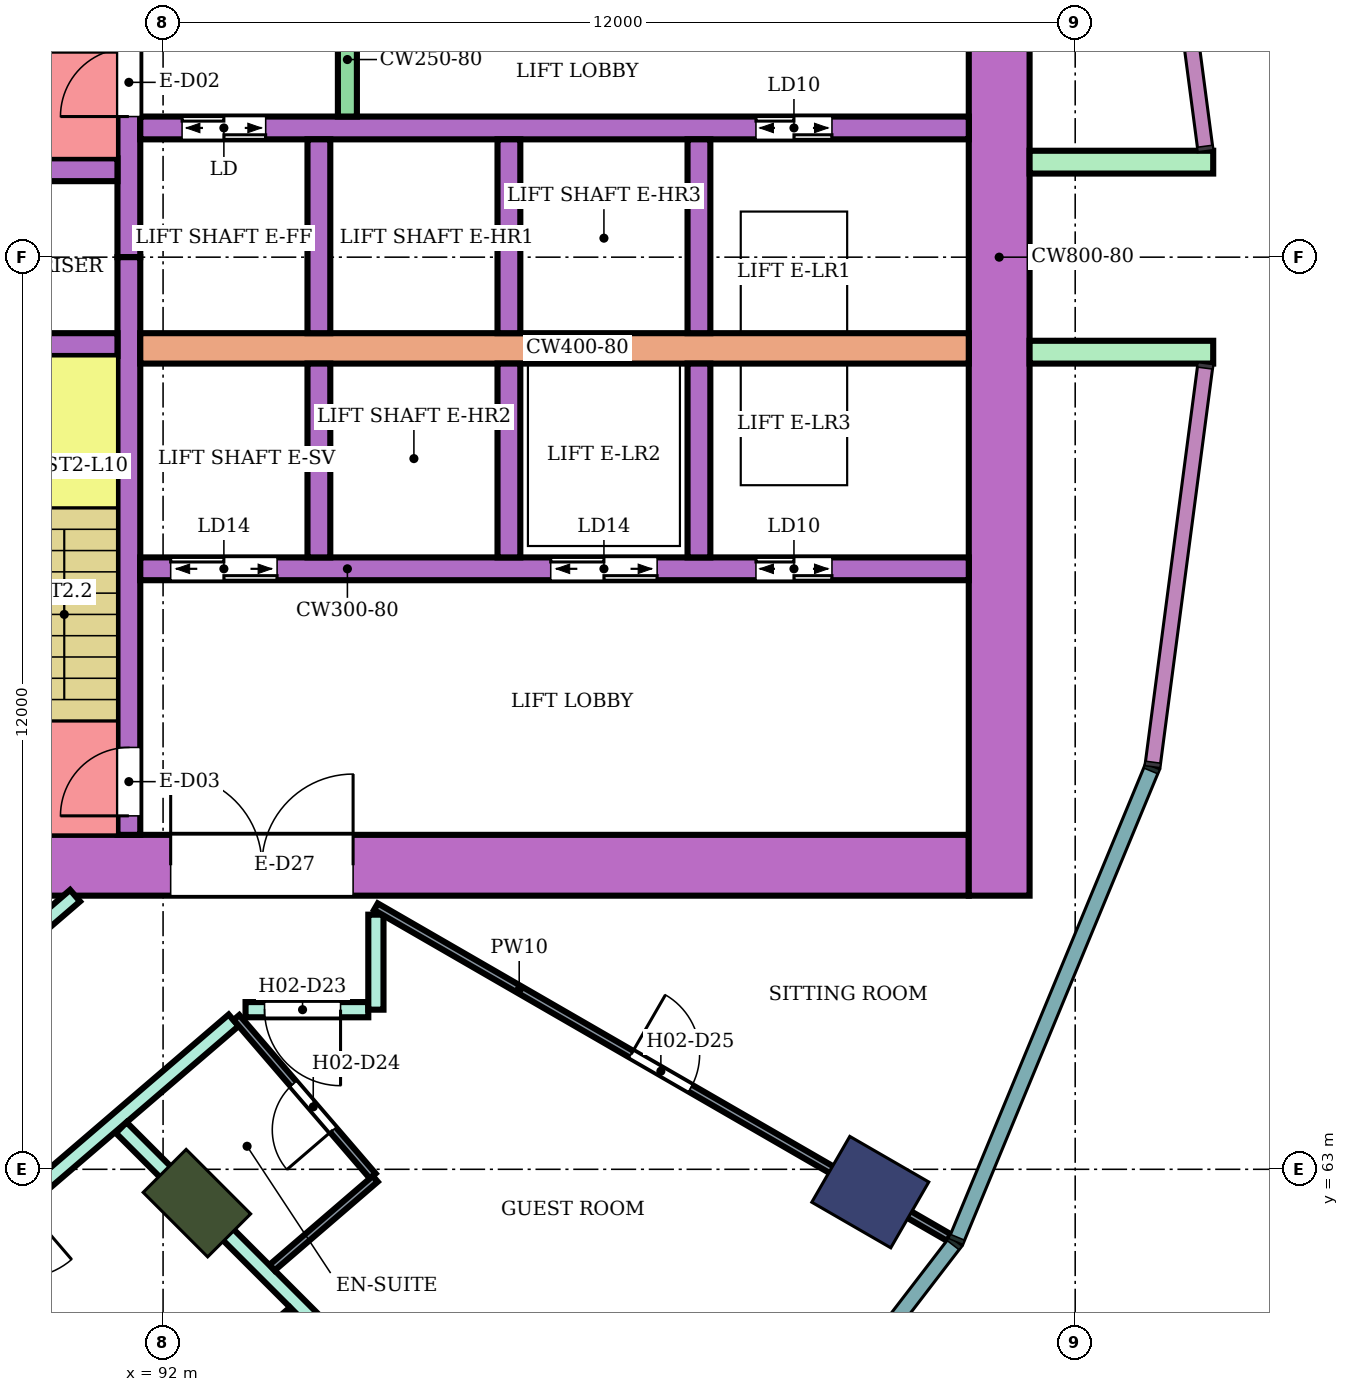
"""IFC4 building model, lengths in metres.
Left out: names, types, materials, properties, quantities, classifications, styles, units other than length and angle.
Written with IfcOpenShell. Run it as: python <this file> out.ifc"""

import sys

from ifc_helpers import new_model, si_unit, direction, frame, frame_2d, origin, origin_2d, place, context, subcontext, project, spatial, rectangle, extrude, element, fill, save


model = new_model("IFC4")
c1 = context("Model", 3, precision=1e-05, world=origin(), true_north=direction((0.0, 1.0)))
c2 = subcontext(c1, "Body", "Model", "MODEL_VIEW")
j1 = project(units=[si_unit("LENGTHUNIT", "METRE"), si_unit("PLANEANGLEUNIT", "RADIAN")], contexts=[c1])
p1 = place(None, origin())
s1 = spatial("IfcSite", under=j1, at=p1, CompositionType="ELEMENT")
p2 = place(p1, origin())
s2 = spatial("IfcBuilding", under=s1, at=p2, CompositionType="ELEMENT")
p3 = place(p2, frame((0.0, 0.0, 47.8)))
s3 = spatial("IfcBuildingStorey", under=s2, at=p3, CompositionType="ELEMENT", Elevation=47.8)
p4 = place(p3, frame((101.304, 62.7, 0.0), z_axis=(0.0, 0.0, 1.0), x_axis=(0.866025403784, -0.5, 0.0)))
e1 = element("IfcColumn", 1, at=p4, inside=s3, PredefinedType="COLUMN", context=c2, shape_type="SweptSolid", body=[
    extrude(rectangle(XDim=1.2, YDim=1.0, at=origin_2d()), origin(), (0.0, 0.0, 1.0), 3.8),
])
p5 = place(p3, frame((92.445, 62.555, 0.0), z_axis=(0.0, 0.0, 1.0), x_axis=(0.707106781187, -0.707106781187, 0.0)))
e2 = element("IfcColumn", 2, at=p5, inside=s3, PredefinedType="COLUMN", context=c2, shape_type="SweptSolid", body=[
    extrude(rectangle(XDim=1.2, YDim=0.8, at=origin_2d()), origin(), (0.0, 0.0, 1.0), 3.8),
])
p6 = place(p3, frame((87.9, 67.0, 0.0), z_axis=(0.0, 0.0, 1.0), x_axis=(1.0, 0.0, 0.0)))
e3 = element("IfcWall", 3, at=p6, inside=s3, PredefinedType="SHEAR", context=c2, shape_type="SweptSolid", body=[
    extrude(rectangle(XDim=14.7, YDim=0.8, at=frame_2d((7.35, 0.0))), origin(), (0.0, 0.0, 1.0), 3.48),
])
p7 = place(p6, frame((4.2, 0.0, 0.0)))
e4 = element("IfcOpeningElement", 4, at=p7, cuts=e3, PredefinedType="OPENING", context=c2, shape_type="SweptSolid", body=[
    extrude(rectangle(XDim=2.4, YDim=2.4, at=frame_2d((1.2, 1.2))), frame((0.0, 0.41, 0.0), z_axis=(0.0, -1.0, 0.0), x_axis=(1.0, 0.0, 0.0)), (0.0, 0.0, 1.0), 0.82),
])
p8 = place(p3, frame((103.0, 66.6, 0.0), z_axis=(0.0, 0.0, 1.0), x_axis=(0.0, 1.0, 0.0)))
e5 = element("IfcWall", 5, at=p8, inside=s3, PredefinedType="SHEAR", context=c2, shape_type="SweptSolid", body=[
    extrude(rectangle(XDim=16.8, YDim=0.8, at=frame_2d((8.4, 0.0))), origin(), (0.0, 0.0, 1.0), 3.48),
])
p9 = place(p3, frame((91.55, 75.0, 0.0), z_axis=(0.0, 0.0, 1.0), x_axis=(0.0, 1.0, 0.0)))
e6 = element("IfcWall", 6, at=p9, inside=s3, PredefinedType="SHEAR", context=c2, shape_type="SweptSolid", body=[
    extrude(rectangle(XDim=7.6, YDim=0.3, at=frame_2d((3.8, 0.0))), origin(), (0.0, 0.0, 1.0), 3.48),
])
p10 = place(p9, frame((1.85, 0.0, 0.0)))
e7 = element("IfcOpeningElement", 7, at=p10, cuts=e6, PredefinedType="OPENING", context=c2, shape_type="SweptSolid", body=[
    extrude(rectangle(XDim=0.9, YDim=2.1, at=frame_2d((0.45, 1.05))), frame((0.0, 0.16, 0.0), z_axis=(0.0, -1.0, 0.0), x_axis=(1.0, 0.0, 0.0)), (0.0, 0.0, 1.0), 0.32),
])
p11 = place(p3, frame((91.55, 67.4, 0.0), z_axis=(0.0, 0.0, 1.0), x_axis=(0.0, 1.0, 0.0)))
e8 = element("IfcWall", 8, at=p11, inside=s3, PredefinedType="SHEAR", context=c2, shape_type="SweptSolid", body=[
    extrude(rectangle(XDim=7.6, YDim=0.3, at=frame_2d((3.8, 0.0))), origin(), (0.0, 0.0, 1.0), 3.48),
])
p12 = place(p11, frame((0.25, 0.0, 0.0)))
e9 = element("IfcOpeningElement", 9, at=p12, cuts=e8, PredefinedType="OPENING", context=c2, shape_type="SweptSolid", body=[
    extrude(rectangle(XDim=0.9, YDim=2.1, at=frame_2d((0.45, 1.05))), frame((0.0, 0.16, 0.0), z_axis=(0.0, -1.0, 0.0), x_axis=(1.0, 0.0, 0.0)), (0.0, 0.0, 1.0), 0.32),
])
p13 = place(p3, frame((88.35, 76.15, 0.0), z_axis=(0.0, 0.0, 1.0), x_axis=(1.0, 0.0, 0.0)))
e10 = element("IfcWall", 10, at=p13, inside=s3, PredefinedType="SHEAR", context=c2, shape_type="SweptSolid", body=[
    extrude(rectangle(XDim=3.05, YDim=0.3, at=frame_2d((1.525, 0.0))), origin(), (0.0, 0.0, 1.0), 3.48),
])
p14 = place(p13, frame((1.1, 0.0, 0.0)))
e11 = element("IfcOpeningElement", 11, at=p14, cuts=e10, PredefinedType="OPENING", context=c2, shape_type="SweptSolid", body=[
    extrude(rectangle(XDim=0.7, YDim=2.0, at=frame_2d((0.35, 1.0))), frame((0.0, 0.16, 0.0), z_axis=(0.0, -1.0, 0.0), x_axis=(1.0, 0.0, 0.0)), (0.0, 0.0, 1.0), 0.32),
])
p15 = place(p3, frame((88.35, 73.85, 0.0), z_axis=(0.0, 0.0, 1.0), x_axis=(1.0, 0.0, 0.0)))
e12 = element("IfcWall", 12, at=p15, inside=s3, PredefinedType="SHEAR", context=c2, shape_type="SweptSolid", body=[
    extrude(rectangle(XDim=3.05, YDim=0.3, at=frame_2d((1.525, 0.0))), origin(), (0.0, 0.0, 1.0), 3.48),
])
p16 = place(p3, frame((91.7, 76.7, 0.0), z_axis=(0.0, 0.0, 1.0), x_axis=(1.0, 0.0, 0.0)))
e13 = element("IfcWall", 13, at=p16, inside=s3, PredefinedType="SHEAR", context=c2, shape_type="SweptSolid", body=[
    extrude(rectangle(XDim=10.9, YDim=0.3, at=frame_2d((5.45, 0.0))), origin(), (0.0, 0.0, 1.0), 3.48),
])
p17 = place(p16, frame((0.55, 0.0, 0.0)))
e14 = element("IfcOpeningElement", 14, at=p17, cuts=e13, PredefinedType="OPENING", context=c2, shape_type="SweptSolid", body=[
    extrude(rectangle(XDim=1.1, YDim=2.1, at=frame_2d((0.55, 1.05))), frame((0.0, 0.16, 0.0), z_axis=(0.0, -1.0, 0.0), x_axis=(1.0, 0.0, 0.0)), (0.0, 0.0, 1.0), 0.32),
])
p18 = place(p16, frame((8.1, 0.0, 0.0)))
e15 = element("IfcOpeningElement", 15, at=p18, cuts=e13, PredefinedType="OPENING", context=c2, shape_type="SweptSolid", body=[
    extrude(rectangle(XDim=1.0, YDim=2.1, at=frame_2d((0.5, 1.05))), frame((0.0, 0.16, 0.0), z_axis=(0.0, -1.0, 0.0), x_axis=(1.0, 0.0, 0.0)), (0.0, 0.0, 1.0), 0.32),
])
p19 = place(p3, frame((91.7, 73.8, 0.0), z_axis=(0.0, 0.0, 1.0), x_axis=(1.0, 0.0, 0.0)))
e16 = element("IfcWall", 16, at=p19, inside=s3, PredefinedType="SHEAR", context=c2, shape_type="SweptSolid", body=[
    extrude(rectangle(XDim=10.9, YDim=0.4, at=frame_2d((5.45, 0.0))), origin(), (0.0, 0.0, 1.0), 3.48),
])
p20 = place(p3, frame((91.7, 70.9, 0.0), z_axis=(0.0, 0.0, 1.0), x_axis=(1.0, 0.0, 0.0)))
e17 = element("IfcWall", 17, at=p20, inside=s3, PredefinedType="SHEAR", context=c2, shape_type="SweptSolid", body=[
    extrude(rectangle(XDim=10.9, YDim=0.3, at=frame_2d((5.45, 0.0))), origin(), (0.0, 0.0, 1.0), 3.48),
])
p21 = place(p20, frame((0.4, 0.0, 0.0)))
e18 = element("IfcOpeningElement", 18, at=p21, cuts=e17, PredefinedType="OPENING", context=c2, shape_type="SweptSolid", body=[
    extrude(rectangle(XDim=1.4, YDim=2.1, at=frame_2d((0.7, 1.05))), frame((0.0, 0.16, 0.0), z_axis=(0.0, -1.0, 0.0), x_axis=(1.0, 0.0, 0.0)), (0.0, 0.0, 1.0), 0.32),
])
p22 = place(p20, frame((5.4, 0.0, 0.0)))
e19 = element("IfcOpeningElement", 19, at=p22, cuts=e17, PredefinedType="OPENING", context=c2, shape_type="SweptSolid", body=[
    extrude(rectangle(XDim=1.4, YDim=2.1, at=frame_2d((0.7, 1.05))), frame((0.0, 0.16, 0.0), z_axis=(0.0, -1.0, 0.0), x_axis=(1.0, 0.0, 0.0)), (0.0, 0.0, 1.0), 0.32),
])
p23 = place(p20, frame((8.1, 0.0, 0.0)))
e20 = element("IfcOpeningElement", 20, at=p23, cuts=e17, PredefinedType="OPENING", context=c2, shape_type="SweptSolid", body=[
    extrude(rectangle(XDim=1.0, YDim=2.1, at=frame_2d((0.5, 1.05))), frame((0.0, 0.16, 0.0), z_axis=(0.0, -1.0, 0.0), x_axis=(1.0, 0.0, 0.0)), (0.0, 0.0, 1.0), 0.32),
])
for number, where, z_axis, x_axis in (
    (21, (94.05, 74.0, 0.0), (0.0, 0.0, 1.0), (0.0, 1.0, 0.0)),
    (22, (96.55, 74.0, 0.0), (0.0, 0.0, 1.0), (0.0, 1.0, 0.0)),
    (23, (99.05, 74.0, 0.0), (0.0, 0.0, 1.0), (0.0, 1.0, 0.0)),
    (24, (94.05, 71.05, 0.0), (0.0, 0.0, 1.0), (0.0, 1.0, 0.0)),
    (25, (96.55, 71.05, 0.0), (0.0, 0.0, 1.0), (0.0, 1.0, 0.0)),
    (26, (99.05, 71.05, 0.0), (0.0, 0.0, 1.0), (0.0, 1.0, 0.0)),
):
    element("IfcWall", number, at=place(p3, frame(where, z_axis=z_axis, x_axis=x_axis)), inside=s3, PredefinedType="SHEAR", context=c2, shape_type="SweptSolid", body=[
        extrude(rectangle(XDim=2.55, YDim=0.3, at=frame_2d((1.275, 0.0))), origin(), (0.0, 0.0, 1.0), 3.48),
    ])
p24 = place(p3, frame((94.425, 76.85, 0.0), z_axis=(0.0, 0.0, 1.0), x_axis=(0.0, 1.0, 0.0)))
e27 = element("IfcWall", 27, at=p24, inside=s3, PredefinedType="SHEAR", context=c2, shape_type="SweptSolid", body=[
    extrude(rectangle(XDim=1.5, YDim=0.25, at=frame_2d((0.75, 0.0))), origin(), (0.0, 0.0, 1.0), 3.48),
])
for number, where, z_axis, x_axis in (
    (28, (103.4, 73.75, 0.0), (0.0, 0.0, 1.0), (1.0, 0.0, 0.0)),
    (29, (103.4, 76.25, 0.0), (0.0, 0.0, 1.0), (1.0, 0.0, 0.0)),
):
    element("IfcWall", number, at=place(p3, frame(where, z_axis=z_axis, x_axis=x_axis)), inside=s3, PredefinedType="NOTDEFINED", context=c2, shape_type="SweptSolid", body=[
        extrude(rectangle(XDim=2.416, YDim=0.3, at=frame_2d((1.208, 0.0))), origin(), (0.0, 0.0, 1.0), 3.8),
    ])
p25 = place(p3, frame((86.877, 63.189, 0.0), z_axis=(0.0, 0.0, 1.0), x_axis=(0.758164888471, 0.652062881853, 0.0)))
e30 = element("IfcWall", 30, at=p25, inside=s3, PredefinedType="PARTITIONING", context=c2, shape_type="SweptSolid", body=[
    extrude(rectangle(XDim=5.23, YDim=0.2, at=frame_2d((2.615, 0.0))), origin(), (0.0, 0.0, 1.0), 3.35),
])
p26 = place(p25, frame((2.63, 0.0, 0.0)))
e31 = element("IfcOpeningElement", 31, at=p26, cuts=e30, PredefinedType="OPENING", context=c2, shape_type="SweptSolid", body=[
    extrude(rectangle(XDim=1.0, YDim=2.1, at=frame_2d((0.5, 1.05))), frame((0.0, 0.11, 0.0), z_axis=(0.0, -1.0, 0.0), x_axis=(1.0, 0.0, 0.0)), (0.0, 0.0, 1.0), 0.22),
])
p27 = place(p3, frame((88.235, 60.931, 0.0), z_axis=(0.0, 0.0, 1.0), x_axis=(0.758799498714, 0.651324282329, 0.0)))
e32 = element("IfcWall", 32, at=p27, inside=s3, PredefinedType="PARTITIONING", context=c2, shape_type="SweptSolid", body=[
    extrude(rectangle(XDim=6.186, YDim=0.2, at=frame_2d((3.093, 0.0))), origin(), (0.0, 0.0, 1.0), 3.35),
])
p28 = place(p27, frame((1.519, 0.0, 0.0)))
e33 = element("IfcOpeningElement", 33, at=p28, cuts=e32, PredefinedType="OPENING", context=c2, shape_type="SweptSolid", body=[
    extrude(rectangle(XDim=1.0, YDim=2.1, at=frame_2d((0.5, 1.05))), frame((0.0, 0.11, 0.0), z_axis=(0.0, -1.0, 0.0), x_axis=(1.0, 0.0, 0.0)), (0.0, 0.0, 1.0), 0.22),
])
p29 = place(p3, frame((91.449, 63.548, 0.0), z_axis=(0.0, 0.0, 1.0), x_axis=(0.706984810649, -0.707228730688, 0.0)))
e34 = element("IfcWall", 34, at=p29, inside=s3, PredefinedType="PARTITIONING", context=c2, shape_type="SweptSolid", body=[
    extrude(rectangle(XDim=7.006, YDim=0.2, at=frame_2d((3.503, 0.0))), origin(), (0.0, 0.0, 1.0), 3.35),
])
p30 = place(p3, frame((93.085, 65.1, 0.0), z_axis=(0.0, 0.0, 1.0), x_axis=(1.0, 0.0, 0.0)))
e35 = element("IfcWall", 35, at=p30, inside=s3, PredefinedType="PARTITIONING", context=c2, shape_type="SweptSolid", body=[
    extrude(rectangle(XDim=1.615, YDim=0.2, at=frame_2d((0.808, 0.0))), origin(), (0.0, 0.0, 1.0), 3.35),
])
p31 = place(p30, frame((0.25, 0.0, 0.0)))
e36 = element("IfcOpeningElement", 36, at=p31, cuts=e35, PredefinedType="OPENING", context=c2, shape_type="SweptSolid", body=[
    extrude(rectangle(XDim=1.0, YDim=2.1, at=frame_2d((0.5, 1.05))), frame((0.0, 0.11, 0.0), z_axis=(0.0, -1.0, 0.0), x_axis=(1.0, 0.0, 0.0)), (0.0, 0.0, 1.0), 0.22),
])
p32 = place(p3, frame((94.8, 65.1, 0.0), z_axis=(0.0, 0.0, 1.0), x_axis=(0.0, 1.0, 0.0)))
e37 = element("IfcWall", 37, at=p32, inside=s3, PredefinedType="PARTITIONING", context=c2, shape_type="SweptSolid", body=[
    extrude(rectangle(XDim=1.25, YDim=0.2, at=frame_2d((0.625, 0.0))), origin(), (0.0, 0.0, 1.0), 3.35),
])
p33 = place(p3, frame((89.974, 57.94, 0.0), z_axis=(0.0, 0.0, 1.0), x_axis=(0.75821417454, 0.652005571699, 0.0)))
e38 = element("IfcWall", 38, at=p33, inside=s3, PredefinedType="PARTITIONING", context=c2, shape_type="SweptSolid", body=[
    extrude(rectangle(XDim=4.915, YDim=0.1, at=frame_2d((2.457, 0.0))), origin(), (0.0, 0.0, 1.0), 3.35),
])
p34 = place(p33, frame((1.017, 0.0, 0.0)))
e39 = element("IfcOpeningElement", 39, at=p34, cuts=e38, PredefinedType="OPENING", context=c2, shape_type="SweptSolid", body=[
    extrude(rectangle(XDim=0.9, YDim=2.1, at=frame_2d((0.45, 1.05))), frame((0.0, 0.06, 0.0), z_axis=(0.0, -1.0, 0.0), x_axis=(1.0, 0.0, 0.0)), (0.0, 0.0, 1.0), 0.12),
])
p35 = place(p3, frame((92.965, 64.997, 0.0), z_axis=(0.0, 0.0, 1.0), x_axis=(0.652069888227, -0.758158862553, 0.0)))
e40 = element("IfcWall", 40, at=p35, inside=s3, PredefinedType="PARTITIONING", context=c2, shape_type="SweptSolid", body=[
    extrude(rectangle(XDim=2.75, YDim=0.1, at=frame_2d((1.375, 0.0))), origin(), (0.0, 0.0, 1.0), 3.35),
])
p36 = place(p35, frame((1.15, 0.0, 0.0)))
e41 = element("IfcOpeningElement", 41, at=p36, cuts=e40, PredefinedType="OPENING", context=c2, shape_type="SweptSolid", body=[
    extrude(rectangle(XDim=0.8, YDim=2.1, at=frame_2d((0.4, 1.05))), frame((0.0, 0.06, 0.0), z_axis=(0.0, -1.0, 0.0), x_axis=(1.0, 0.0, 0.0)), (0.0, 0.0, 1.0), 0.12),
])
p37 = place(p3, frame((93.435, 61.707, 0.0), z_axis=(0.0, 0.0, 1.0), x_axis=(0.758070495124, 0.652172618578, 0.0)))
e42 = element("IfcWall", 42, at=p37, inside=s3, PredefinedType="PARTITIONING", context=c2, shape_type="SweptSolid", body=[
    extrude(rectangle(XDim=1.789, YDim=0.1, at=frame_2d((0.895, 0.0))), origin(), (0.0, 0.0, 1.0), 3.35),
])
p38 = place(p3, frame((94.8, 66.455, 0.0), z_axis=(0.0, 0.0, 1.0), x_axis=(0.86602264145, -0.500004784474, 0.0)))
e43 = element("IfcWall", 43, at=p38, inside=s3, PredefinedType="PARTITIONING", context=c2, shape_type="SweptSolid", body=[
    extrude(rectangle(XDim=8.708, YDim=0.1, at=frame_2d((4.354, 0.0))), origin(), (0.0, 0.0, 1.0), 3.35),
])
p39 = place(p38, frame((3.879, 0.0, 0.0)))
e44 = element("IfcOpeningElement", 44, at=p39, cuts=e43, PredefinedType="OPENING", context=c2, shape_type="SweptSolid", body=[
    extrude(rectangle(XDim=0.9, YDim=2.1, at=frame_2d((0.45, 1.05))), frame((0.0, 0.06, 0.0), z_axis=(0.0, -1.0, 0.0), x_axis=(1.0, 0.0, 0.0)), (0.0, 0.0, 1.0), 0.12),
])
p40 = place(p31, frame((1.0, 0.0, 0.0), z_axis=(0.0, 0.0, 1.0), x_axis=(-1.0, 0.0, 0.0)))
e45 = element("IfcDoor", 45, at=p40, inside=s3, OperationType="SINGLE_SWING_LEFT", PredefinedType="DOOR", context=c2, shape_type="SweptSolid", body=[
    extrude(rectangle(XDim=1.0, YDim=2.1, at=frame_2d((0.5, 1.05))), frame((0.0, 0.025, 0.0), z_axis=(0.0, -1.0, 0.0), x_axis=(1.0, 0.0, 0.0)), (0.0, 0.0, 1.0), 0.05),
])
fill(e36, e45)
p41 = place(p36, frame((0.8, 0.0, 0.0), z_axis=(0.0, 0.0, 1.0), x_axis=(-1.0, 0.0, 0.0)))
e46 = element("IfcDoor", 46, at=p41, inside=s3, OperationType="SINGLE_SWING_LEFT", PredefinedType="DOOR", context=c2, shape_type="SweptSolid", body=[
    extrude(rectangle(XDim=0.8, YDim=2.1, at=frame_2d((0.4, 1.05))), frame((0.0, 0.025, 0.0), z_axis=(0.0, -1.0, 0.0), x_axis=(1.0, 0.0, 0.0)), (0.0, 0.0, 1.0), 0.05),
])
fill(e41, e46)
p42 = place(p39, origin())
e47 = element("IfcDoor", 47, at=p42, inside=s3, OperationType="SINGLE_SWING_LEFT", PredefinedType="DOOR", context=c2, shape_type="SweptSolid", body=[
    extrude(rectangle(XDim=0.9, YDim=2.1, at=frame_2d((0.45, 1.05))), frame((0.0, 0.025, 0.0), z_axis=(0.0, -1.0, 0.0), x_axis=(1.0, 0.0, 0.0)), (0.0, 0.0, 1.0), 0.05),
])
fill(e44, e47)
p43 = place(p10, origin())
e48 = element("IfcDoor", 48, at=p43, inside=s3, OperationType="SINGLE_SWING_LEFT", PredefinedType="DOOR", context=c2, shape_type="SweptSolid", body=[
    extrude(rectangle(XDim=0.9, YDim=2.1, at=frame_2d((0.45, 1.05))), frame((0.0, 0.025, 0.0), z_axis=(0.0, -1.0, 0.0), x_axis=(1.0, 0.0, 0.0)), (0.0, 0.0, 1.0), 0.05),
])
fill(e7, e48)
p44 = place(p12, origin())
e49 = element("IfcDoor", 49, at=p44, inside=s3, OperationType="SINGLE_SWING_LEFT", PredefinedType="DOOR", context=c2, shape_type="SweptSolid", body=[
    extrude(rectangle(XDim=0.9, YDim=2.1, at=frame_2d((0.45, 1.05))), frame((0.0, 0.025, 0.0), z_axis=(0.0, -1.0, 0.0), x_axis=(1.0, 0.0, 0.0)), (0.0, 0.0, 1.0), 0.05),
])
fill(e9, e49)
p45 = place(p17, origin())
e50 = element("IfcDoor", 50, at=p45, inside=s3, OperationType="DOUBLE_DOOR_SLIDING", PredefinedType="DOOR", context=c2, shape_type="SweptSolid", body=[
    extrude(rectangle(XDim=1.1, YDim=2.1, at=frame_2d((0.55, 1.05))), frame((0.0, 0.025, 0.0), z_axis=(0.0, -1.0, 0.0), x_axis=(1.0, 0.0, 0.0)), (0.0, 0.0, 1.0), 0.05),
])
fill(e14, e50)
p46 = place(p18, origin())
e51 = element("IfcDoor", 51, at=p46, inside=s3, OperationType="DOUBLE_DOOR_SLIDING", PredefinedType="DOOR", context=c2, shape_type="SweptSolid", body=[
    extrude(rectangle(XDim=1.0, YDim=2.1, at=frame_2d((0.5, 1.05))), frame((0.0, 0.025, 0.0), z_axis=(0.0, -1.0, 0.0), x_axis=(1.0, 0.0, 0.0)), (0.0, 0.0, 1.0), 0.05),
])
fill(e15, e51)
p47 = place(p21, origin())
e52 = element("IfcDoor", 52, at=p47, inside=s3, OperationType="DOUBLE_DOOR_SLIDING", PredefinedType="DOOR", context=c2, shape_type="SweptSolid", body=[
    extrude(rectangle(XDim=1.4, YDim=2.1, at=frame_2d((0.7, 1.05))), frame((0.0, 0.025, 0.0), z_axis=(0.0, -1.0, 0.0), x_axis=(1.0, 0.0, 0.0)), (0.0, 0.0, 1.0), 0.05),
])
fill(e18, e52)
p48 = place(p22, origin())
e53 = element("IfcDoor", 53, at=p48, inside=s3, OperationType="DOUBLE_DOOR_SLIDING", PredefinedType="DOOR", context=c2, shape_type="SweptSolid", body=[
    extrude(rectangle(XDim=1.4, YDim=2.1, at=frame_2d((0.7, 1.05))), frame((0.0, 0.025, 0.0), z_axis=(0.0, -1.0, 0.0), x_axis=(1.0, 0.0, 0.0)), (0.0, 0.0, 1.0), 0.05),
])
fill(e19, e53)
p49 = place(p23, origin())
e54 = element("IfcDoor", 54, at=p49, inside=s3, OperationType="DOUBLE_DOOR_SLIDING", PredefinedType="DOOR", context=c2, shape_type="SweptSolid", body=[
    extrude(rectangle(XDim=1.0, YDim=2.1, at=frame_2d((0.5, 1.05))), frame((0.0, 0.025, 0.0), z_axis=(0.0, -1.0, 0.0), x_axis=(1.0, 0.0, 0.0)), (0.0, 0.0, 1.0), 0.05),
])
fill(e20, e54)
p50 = place(p7, origin())
e55 = element("IfcDoor", 55, at=p50, inside=s3, OperationType="DOUBLE_DOOR_SINGLE_SWING", PredefinedType="DOOR", context=c2, shape_type="SweptSolid", body=[
    extrude(rectangle(XDim=2.4, YDim=2.4, at=frame_2d((1.2, 1.2))), frame((0.0, 0.025, 0.0), z_axis=(0.0, -1.0, 0.0), x_axis=(1.0, 0.0, 0.0)), (0.0, 0.0, 1.0), 0.05),
])
fill(e4, e55)
save(model, sys.argv[1])
